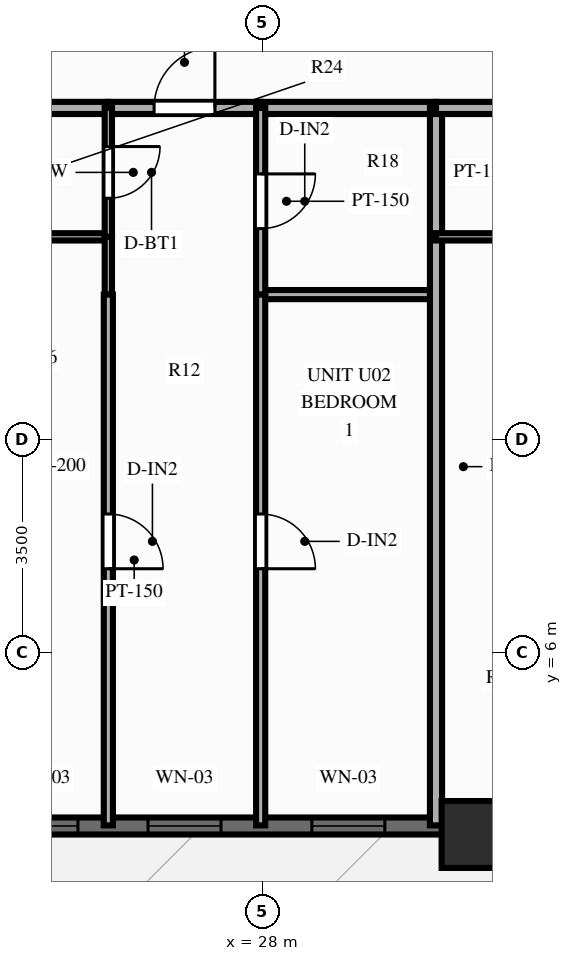
"""IFC4 building model, lengths in metres.
Left out: names, types, materials, properties, quantities, classifications, styles, units other than length and angle.
Written with IfcOpenShell. Run it as: python <this file> out.ifc"""

import sys

from ifc_helpers import new_model, si_unit, direction, frame, frame_2d, origin, origin_2d, place, context, subcontext, project, spatial, rectangle, extrude, source, transform, mapped, element, fill, save


model = new_model("IFC4")
c1 = context("Model", 3, precision=1e-05, world=origin(), true_north=direction((0.0, 1.0)))
c2 = subcontext(c1, "Body", "Model", "MODEL_VIEW")
j1 = project(units=[si_unit("LENGTHUNIT", "METRE"), si_unit("PLANEANGLEUNIT", "RADIAN")], contexts=[c1])
p1 = place(None, origin())
s1 = spatial("IfcSite", under=j1, at=p1, CompositionType="ELEMENT")
p2 = place(p1, origin())
s2 = spatial("IfcBuilding", under=s1, at=p2, CompositionType="ELEMENT")
p3 = place(p2, frame((0.0, 0.0, 22.4)))
s3 = spatial("IfcBuildingStorey", under=s2, at=p3, CompositionType="ELEMENT", Elevation=22.4)
m1 = source(origin(), c2, "Body", "SweptSolid", [
    extrude(rectangle(XDim=1.1, YDim=1.1, at=origin_2d()), origin(), (0.0, 0.0, 1.0), 3.0),
])
p4 = place(p3, frame((31.5, 3.0, 0.0), z_axis=(0.0, 0.0, 1.0), x_axis=(1.0, 0.0, 0.0)))
e1 = element("IfcColumn", 1, at=p4, inside=s3, PredefinedType="COLUMN", context=c2, shape_type="MappedRepresentation", body=[
    mapped(m1, transform((0.0, 0.0, 0.0), scale=1.0)),
])
p5 = place(p3, frame((15.5, 3.14, 0.0), z_axis=(0.0, 0.0, 1.0), x_axis=(1.0, 0.0, 0.0)))
e2 = element("IfcWall", 2, at=p5, inside=s3, PredefinedType="SOLIDWALL", context=c2, shape_type="SweptSolid", body=[
    extrude(rectangle(XDim=45.0, YDim=0.28, at=frame_2d((22.5, 0.0))), origin(), (0.0, 0.0, 1.0), 2.28),
])
p6 = place(p5, frame((0.785, 0.0, 0.25)))
e3 = element("IfcOpeningElement", 3, at=p6, cuts=e2, PredefinedType="OPENING", context=c2, shape_type="SweptSolid", body=[
    extrude(rectangle(XDim=1.2, YDim=1.5, at=frame_2d((0.6, 0.75))), frame((0.0, 0.152, 0.0), z_axis=(0.0, -1.0, 0.0), x_axis=(1.0, 0.0, 0.0)), (0.0, 0.0, 1.0), 0.304),
])
p7 = place(p5, frame((3.033, 0.0, 0.25)))
e4 = element("IfcOpeningElement", 4, at=p7, cuts=e2, PredefinedType="OPENING", context=c2, shape_type="SweptSolid", body=[
    extrude(rectangle(XDim=1.2, YDim=1.5, at=frame_2d((0.6, 0.75))), frame((0.0, 0.152, 0.0), z_axis=(0.0, -1.0, 0.0), x_axis=(1.0, 0.0, 0.0)), (0.0, 0.0, 1.0), 0.304),
])
p8 = place(p5, frame((5.727, 0.0, 0.25)))
e5 = element("IfcOpeningElement", 5, at=p8, cuts=e2, PredefinedType="OPENING", context=c2, shape_type="SweptSolid", body=[
    extrude(rectangle(XDim=1.2, YDim=1.5, at=frame_2d((0.6, 0.75))), frame((0.0, 0.152, 0.0), z_axis=(0.0, -1.0, 0.0), x_axis=(1.0, 0.0, 0.0)), (0.0, 0.0, 1.0), 0.304),
])
p9 = place(p5, frame((8.269, 0.0, 0.25)))
e6 = element("IfcOpeningElement", 6, at=p9, cuts=e2, PredefinedType="OPENING", context=c2, shape_type="SweptSolid", body=[
    extrude(rectangle(XDim=1.2, YDim=1.5, at=frame_2d((0.6, 0.75))), frame((0.0, 0.152, 0.0), z_axis=(0.0, -1.0, 0.0), x_axis=(1.0, 0.0, 0.0)), (0.0, 0.0, 1.0), 0.304),
])
p10 = place(p5, frame((10.621, 0.0, 0.25)))
e7 = element("IfcOpeningElement", 7, at=p10, cuts=e2, PredefinedType="OPENING", context=c2, shape_type="SweptSolid", body=[
    extrude(rectangle(XDim=1.2, YDim=1.5, at=frame_2d((0.6, 0.75))), frame((0.0, 0.152, 0.0), z_axis=(0.0, -1.0, 0.0), x_axis=(1.0, 0.0, 0.0)), (0.0, 0.0, 1.0), 0.304),
])
p11 = place(p5, frame((13.316, 0.0, 0.25)))
e8 = element("IfcOpeningElement", 8, at=p11, cuts=e2, PredefinedType="OPENING", context=c2, shape_type="SweptSolid", body=[
    extrude(rectangle(XDim=1.2, YDim=1.5, at=frame_2d((0.6, 0.75))), frame((0.0, 0.152, 0.0), z_axis=(0.0, -1.0, 0.0), x_axis=(1.0, 0.0, 0.0)), (0.0, 0.0, 1.0), 0.304),
])
p12 = place(p5, frame((16.624, 0.0, 0.25)))
e9 = element("IfcOpeningElement", 9, at=p12, cuts=e2, PredefinedType="OPENING", context=c2, shape_type="SweptSolid", body=[
    extrude(rectangle(XDim=0.7, YDim=1.5, at=frame_2d((0.35, 0.75))), frame((0.0, 0.152, 0.0), z_axis=(0.0, -1.0, 0.0), x_axis=(1.0, 0.0, 0.0)), (0.0, 0.0, 1.0), 0.304),
])
p13 = place(p5, frame((18.141, 0.0, 0.25)))
e10 = element("IfcOpeningElement", 10, at=p13, cuts=e2, PredefinedType="OPENING", context=c2, shape_type="SweptSolid", body=[
    extrude(rectangle(XDim=1.2, YDim=1.5, at=frame_2d((0.6, 0.75))), frame((0.0, 0.152, 0.0), z_axis=(0.0, -1.0, 0.0), x_axis=(1.0, 0.0, 0.0)), (0.0, 0.0, 1.0), 0.304),
])
p14 = place(p5, frame((21.874, 0.0, 0.0), z_axis=(0.0, 0.0, 1.0), x_axis=(-1.0, 0.0, 0.0)))
e11 = element("IfcOpeningElement", 11, at=p14, cuts=e2, PredefinedType="OPENING", context=c2, shape_type="SweptSolid", body=[
    extrude(rectangle(XDim=1.1, YDim=2.15, at=frame_2d((0.55, 1.075))), frame((0.0, 0.152, 0.0), z_axis=(0.0, -1.0, 0.0), x_axis=(1.0, 0.0, 0.0)), (0.0, 0.0, 1.0), 0.304),
])
p15 = place(p5, frame((23.223, 0.0, 0.25)))
e12 = element("IfcOpeningElement", 12, at=p15, cuts=e2, PredefinedType="OPENING", context=c2, shape_type="SweptSolid", body=[
    extrude(rectangle(XDim=1.2, YDim=1.5, at=frame_2d((0.6, 0.75))), frame((0.0, 0.152, 0.0), z_axis=(0.0, -1.0, 0.0), x_axis=(1.0, 0.0, 0.0)), (0.0, 0.0, 1.0), 0.304),
])
p16 = place(p5, frame((25.507, 0.0, 0.25)))
e13 = element("IfcOpeningElement", 13, at=p16, cuts=e2, PredefinedType="OPENING", context=c2, shape_type="SweptSolid", body=[
    extrude(rectangle(XDim=1.2, YDim=1.5, at=frame_2d((0.6, 0.75))), frame((0.0, 0.152, 0.0), z_axis=(0.0, -1.0, 0.0), x_axis=(1.0, 0.0, 0.0)), (0.0, 0.0, 1.0), 0.304),
])
p17 = place(p5, frame((27.6, 0.0, 0.25)))
e14 = element("IfcOpeningElement", 14, at=p17, cuts=e2, PredefinedType="OPENING", context=c2, shape_type="SweptSolid", body=[
    extrude(rectangle(XDim=0.7, YDim=1.5, at=frame_2d((0.35, 0.75))), frame((0.0, 0.152, 0.0), z_axis=(0.0, -1.0, 0.0), x_axis=(1.0, 0.0, 0.0)), (0.0, 0.0, 1.0), 0.304),
])
p18 = place(p5, frame((30.589, 0.0, 0.25)))
e15 = element("IfcOpeningElement", 15, at=p18, cuts=e2, PredefinedType="OPENING", context=c2, shape_type="SweptSolid", body=[
    extrude(rectangle(XDim=1.2, YDim=1.5, at=frame_2d((0.6, 0.75))), frame((0.0, 0.152, 0.0), z_axis=(0.0, -1.0, 0.0), x_axis=(1.0, 0.0, 0.0)), (0.0, 0.0, 1.0), 0.304),
])
p19 = place(p5, frame((32.872, 0.0, 0.25)))
e16 = element("IfcOpeningElement", 16, at=p19, cuts=e2, PredefinedType="OPENING", context=c2, shape_type="SweptSolid", body=[
    extrude(rectangle(XDim=1.2, YDim=1.5, at=frame_2d((0.6, 0.75))), frame((0.0, 0.152, 0.0), z_axis=(0.0, -1.0, 0.0), x_axis=(1.0, 0.0, 0.0)), (0.0, 0.0, 1.0), 0.304),
])
p20 = place(p5, frame((35.455, 0.0, 0.25)))
e17 = element("IfcOpeningElement", 17, at=p20, cuts=e2, PredefinedType="OPENING", context=c2, shape_type="SweptSolid", body=[
    extrude(rectangle(XDim=1.2, YDim=1.5, at=frame_2d((0.6, 0.75))), frame((0.0, 0.152, 0.0), z_axis=(0.0, -1.0, 0.0), x_axis=(1.0, 0.0, 0.0)), (0.0, 0.0, 1.0), 0.304),
])
p21 = place(p5, frame((37.954, 0.0, 0.25)))
e18 = element("IfcOpeningElement", 18, at=p21, cuts=e2, PredefinedType="OPENING", context=c2, shape_type="SweptSolid", body=[
    extrude(rectangle(XDim=1.2, YDim=1.5, at=frame_2d((0.6, 0.75))), frame((0.0, 0.152, 0.0), z_axis=(0.0, -1.0, 0.0), x_axis=(1.0, 0.0, 0.0)), (0.0, 0.0, 1.0), 0.304),
])
p22 = place(p5, frame((40.238, 0.0, 0.25)))
e19 = element("IfcOpeningElement", 19, at=p22, cuts=e2, PredefinedType="OPENING", context=c2, shape_type="SweptSolid", body=[
    extrude(rectangle(XDim=1.2, YDim=1.5, at=frame_2d((0.6, 0.75))), frame((0.0, 0.152, 0.0), z_axis=(0.0, -1.0, 0.0), x_axis=(1.0, 0.0, 0.0)), (0.0, 0.0, 1.0), 0.304),
])
p23 = place(p5, frame((42.716, 0.0, 0.25)))
e20 = element("IfcOpeningElement", 20, at=p23, cuts=e2, PredefinedType="OPENING", context=c2, shape_type="SweptSolid", body=[
    extrude(rectangle(XDim=1.2, YDim=1.5, at=frame_2d((0.6, 0.75))), frame((0.0, 0.152, 0.0), z_axis=(0.0, -1.0, 0.0), x_axis=(1.0, 0.0, 0.0)), (0.0, 0.0, 1.0), 0.304),
])
p24 = place(p3, frame((23.269, 14.95, 0.0), z_axis=(0.0, 0.0, 1.0), x_axis=(1.0, 0.0, 0.0)))
e21 = element("IfcWall", 21, at=p24, inside=s3, PredefinedType="PARTITIONING", context=c2, shape_type="SweptSolid", body=[
    extrude(rectangle(XDim=2.2, YDim=0.2, at=frame_2d((1.1, 0.0))), origin(), (0.0, 0.0, 1.0), 2.79),
])
p25 = place(p3, frame((25.469, 14.95, 0.0), z_axis=(0.0, 0.0, 1.0), x_axis=(1.0, 0.0, 0.0)))
e22 = element("IfcWall", 22, at=p25, inside=s3, PredefinedType="PARTITIONING", context=c2, shape_type="SweptSolid", body=[
    extrude(rectangle(XDim=2.505, YDim=0.2, at=frame_2d((1.252, 0.0))), origin(), (0.0, 0.0, 1.0), 2.79),
])
p26 = place(p25, frame((0.752, 0.0, 0.0)))
e23 = element("IfcOpeningElement", 23, at=p26, cuts=e22, PredefinedType="OPENING", context=c2, shape_type="SweptSolid", body=[
    extrude(rectangle(XDim=1.0, YDim=2.15, at=frame_2d((0.5, 1.075))), frame((0.0, 0.112, 0.0), z_axis=(0.0, -1.0, 0.0), x_axis=(1.0, 0.0, 0.0)), (0.0, 0.0, 1.0), 0.224),
])
p27 = place(p3, frame((27.974, 14.95, 0.0), z_axis=(0.0, 0.0, 1.0), x_axis=(1.0, 0.0, 0.0)))
e24 = element("IfcWall", 24, at=p27, inside=s3, PredefinedType="PARTITIONING", context=c2, shape_type="SweptSolid", body=[
    extrude(rectangle(XDim=2.884, YDim=0.2, at=frame_2d((1.442, 0.0))), origin(), (0.0, 0.0, 1.0), 2.79),
])
p28 = place(p3, frame((23.269, 12.83, 0.0), z_axis=(0.0, 0.0, 1.0), x_axis=(1.0, 0.0, 0.0)))
e25 = element("IfcWall", 25, at=p28, inside=s3, PredefinedType="PARTITIONING", context=c2, shape_type="SweptSolid", body=[
    extrude(rectangle(XDim=2.2, YDim=0.12, at=frame_2d((1.1, 0.0))), origin(), (0.0, 0.0, 1.0), 2.79),
])
p29 = place(p3, frame((27.974, 11.88, 0.0), z_axis=(0.0, 0.0, 1.0), x_axis=(1.0, 0.0, 0.0)))
e26 = element("IfcWall", 26, at=p29, inside=s3, PredefinedType="PARTITIONING", context=c2, shape_type="SweptSolid", body=[
    extrude(rectangle(XDim=2.884, YDim=0.15, at=frame_2d((1.442, 0.0))), origin(), (0.0, 0.0, 1.0), 2.79),
])
p30 = place(p3, frame((25.469, 14.95, 0.0), z_axis=(0.0, 0.0, 1.0), x_axis=(0.0, -1.0, 0.0)))
e27 = element("IfcWall", 27, at=p30, inside=s3, PredefinedType="PARTITIONING", context=c2, shape_type="SweptSolid", body=[
    extrude(rectangle(XDim=2.12, YDim=0.12, at=frame_2d((1.06, 0.0))), origin(), (0.0, 0.0, 1.0), 2.79),
])
p31 = place(p30, frame((0.635, 0.0, 0.0)))
e28 = element("IfcOpeningElement", 28, at=p31, cuts=e27, PredefinedType="OPENING", context=c2, shape_type="SweptSolid", body=[
    extrude(rectangle(XDim=0.85, YDim=2.05, at=frame_2d((0.425, 1.025))), frame((0.0, 0.072, 0.0), z_axis=(0.0, -1.0, 0.0), x_axis=(1.0, 0.0, 0.0)), (0.0, 0.0, 1.0), 0.144),
])
p32 = place(p3, frame((25.469, 12.83, 0.0), z_axis=(0.0, 0.0, 1.0), x_axis=(0.0, -1.0, 0.0)))
e29 = element("IfcWall", 29, at=p32, inside=s3, PredefinedType="PARTITIONING", context=c2, shape_type="SweptSolid", body=[
    extrude(rectangle(XDim=0.95, YDim=0.12, at=frame_2d((0.475, 0.0))), origin(), (0.0, 0.0, 1.0), 2.79),
])
p33 = place(p3, frame((25.469, 11.88, 0.0), z_axis=(0.0, 0.0, 1.0), x_axis=(0.0, -1.0, 0.0)))
e30 = element("IfcWall", 30, at=p33, inside=s3, PredefinedType="PARTITIONING", context=c2, shape_type="SweptSolid", body=[
    extrude(rectangle(XDim=8.73, YDim=0.15, at=frame_2d((4.365, 0.0))), origin(), (0.0, 0.0, 1.0), 2.79),
])
p34 = place(p33, frame((3.609, 0.0, 0.0)))
e31 = element("IfcOpeningElement", 31, at=p34, cuts=e30, PredefinedType="OPENING", context=c2, shape_type="SweptSolid", body=[
    extrude(rectangle(XDim=0.9, YDim=2.1, at=frame_2d((0.45, 1.05))), frame((0.0, 0.087, 0.0), z_axis=(0.0, -1.0, 0.0), x_axis=(1.0, 0.0, 0.0)), (0.0, 0.0, 1.0), 0.174),
])
p35 = place(p3, frame((27.974, 14.95, 0.0), z_axis=(0.0, 0.0, 1.0), x_axis=(0.0, -1.0, 0.0)))
e32 = element("IfcWall", 32, at=p35, inside=s3, PredefinedType="PARTITIONING", context=c2, shape_type="SweptSolid", body=[
    extrude(rectangle(XDim=3.07, YDim=0.15, at=frame_2d((1.535, 0.0))), origin(), (0.0, 0.0, 1.0), 2.79),
])
p36 = place(p35, frame((1.085, 0.0, 0.0)))
e33 = element("IfcOpeningElement", 33, at=p36, cuts=e32, PredefinedType="OPENING", context=c2, shape_type="SweptSolid", body=[
    extrude(rectangle(XDim=0.9, YDim=2.1, at=frame_2d((0.45, 1.05))), frame((0.0, 0.087, 0.0), z_axis=(0.0, -1.0, 0.0), x_axis=(1.0, 0.0, 0.0)), (0.0, 0.0, 1.0), 0.174),
])
p37 = place(p3, frame((27.974, 11.88, 0.0), z_axis=(0.0, 0.0, 1.0), x_axis=(0.0, -1.0, 0.0)))
e34 = element("IfcWall", 34, at=p37, inside=s3, PredefinedType="PARTITIONING", context=c2, shape_type="SweptSolid", body=[
    extrude(rectangle(XDim=8.73, YDim=0.15, at=frame_2d((4.365, 0.0))), origin(), (0.0, 0.0, 1.0), 2.79),
])
p38 = place(p37, frame((3.609, 0.0, 0.0)))
e35 = element("IfcOpeningElement", 35, at=p38, cuts=e34, PredefinedType="OPENING", context=c2, shape_type="SweptSolid", body=[
    extrude(rectangle(XDim=0.9, YDim=2.1, at=frame_2d((0.45, 1.05))), frame((0.0, 0.087, 0.0), z_axis=(0.0, -1.0, 0.0), x_axis=(1.0, 0.0, 0.0)), (0.0, 0.0, 1.0), 0.174),
])
p39 = place(p3, frame((30.858, 14.95, 0.0), z_axis=(0.0, 0.0, 1.0), x_axis=(0.0, -1.0, 0.0)))
e36 = element("IfcWall", 36, at=p39, inside=s3, PredefinedType="PARTITIONING", context=c2, shape_type="SweptSolid", body=[
    extrude(rectangle(XDim=11.8, YDim=0.2, at=frame_2d((5.9, 0.0))), origin(), (0.0, 0.0, 1.0), 2.24),
])
p40 = place(p3, frame((30.858, 14.95, 0.0), z_axis=(0.0, 0.0, 1.0), x_axis=(1.0, 0.0, 0.0)))
e37 = element("IfcWall", 37, at=p40, inside=s3, PredefinedType="PARTITIONING", context=c2, shape_type="SweptSolid", body=[
    extrude(rectangle(XDim=2.2, YDim=0.2, at=frame_2d((1.1, 0.0))), origin(), (0.0, 0.0, 1.0), 2.79),
])
p41 = place(p3, frame((30.858, 12.83, 0.0), z_axis=(0.0, 0.0, 1.0), x_axis=(1.0, 0.0, 0.0)))
e38 = element("IfcWall", 38, at=p41, inside=s3, PredefinedType="PARTITIONING", context=c2, shape_type="SweptSolid", body=[
    extrude(rectangle(XDim=2.2, YDim=0.12, at=frame_2d((1.1, 0.0))), origin(), (0.0, 0.0, 1.0), 2.79),
])
m2 = source(origin(), c2, "Body", "SweptSolid", [
    extrude(rectangle(XDim=1.2, YDim=1.5, at=frame_2d((0.6, 0.75))), frame((0.0, 0.03, 0.0), z_axis=(0.0, -1.0, 0.0), x_axis=(1.0, 0.0, 0.0)), (0.0, 0.0, 1.0), 0.06),
])
p42 = place(p9, origin())
e39 = element("IfcWindow", 39, at=p42, inside=s3, PartitioningType="SINGLE_PANEL", PredefinedType="WINDOW", context=c2, shape_type="MappedRepresentation", body=[
    mapped(m2, transform((0.0, 0.0, 0.0), scale=1.0)),
])
fill(e6, e39)
p43 = place(p10, origin())
e40 = element("IfcWindow", 40, at=p43, inside=s3, PartitioningType="SINGLE_PANEL", PredefinedType="WINDOW", context=c2, shape_type="MappedRepresentation", body=[
    mapped(m2, transform((0.0, 0.0, 0.0), scale=1.0)),
])
fill(e7, e40)
p44 = place(p11, origin())
e41 = element("IfcWindow", 41, at=p44, inside=s3, PartitioningType="SINGLE_PANEL", PredefinedType="WINDOW", context=c2, shape_type="MappedRepresentation", body=[
    mapped(m2, transform((0.0, 0.0, 0.0), scale=1.0)),
])
fill(e8, e41)
m3 = source(origin(), c2, "Body", "SweptSolid", [
    extrude(rectangle(XDim=1.0, YDim=2.15, at=frame_2d((0.5, 1.075))), frame((0.0, 0.025, 0.0), z_axis=(0.0, -1.0, 0.0), x_axis=(1.0, 0.0, 0.0)), (0.0, 0.0, 1.0), 0.05),
])
p45 = place(p26, origin())
e42 = element("IfcDoor", 42, at=p45, inside=s3, OperationType="SINGLE_SWING_RIGHT", PredefinedType="DOOR", context=c2, shape_type="MappedRepresentation", body=[
    mapped(m3, transform((0.0, 0.0, 0.0), scale=1.0)),
])
fill(e23, e42)
m4 = source(origin(), c2, "Body", "SweptSolid", [
    extrude(rectangle(XDim=0.85, YDim=2.05, at=frame_2d((0.425, 1.025))), frame((0.0, 0.025, 0.0), z_axis=(0.0, -1.0, 0.0), x_axis=(1.0, 0.0, 0.0)), (0.0, 0.0, 1.0), 0.05),
])
p46 = place(p31, origin())
e43 = element("IfcDoor", 43, at=p46, inside=s3, OperationType="SINGLE_SWING_LEFT", PredefinedType="DOOR", context=c2, shape_type="MappedRepresentation", body=[
    mapped(m4, transform((0.0, 0.0, 0.0), scale=1.0)),
])
fill(e28, e43)
m5 = source(origin(), c2, "Body", "SweptSolid", [
    extrude(rectangle(XDim=0.9, YDim=2.1, at=frame_2d((0.45, 1.05))), frame((0.0, 0.025, 0.0), z_axis=(0.0, -1.0, 0.0), x_axis=(1.0, 0.0, 0.0)), (0.0, 0.0, 1.0), 0.05),
])
p47 = place(p34, origin())
e44 = element("IfcDoor", 44, at=p47, inside=s3, OperationType="SINGLE_SWING_RIGHT", PredefinedType="DOOR", context=c2, shape_type="MappedRepresentation", body=[
    mapped(m5, transform((0.0, 0.0, 0.0), scale=1.0)),
])
fill(e31, e44)
p48 = place(p36, origin())
e45 = element("IfcDoor", 45, at=p48, inside=s3, OperationType="SINGLE_SWING_LEFT", PredefinedType="DOOR", context=c2, shape_type="MappedRepresentation", body=[
    mapped(m5, transform((0.0, 0.0, 0.0), scale=1.0)),
])
fill(e33, e45)
p49 = place(p38, origin())
e46 = element("IfcDoor", 46, at=p49, inside=s3, OperationType="SINGLE_SWING_RIGHT", PredefinedType="DOOR", context=c2, shape_type="MappedRepresentation", body=[
    mapped(m5, transform((0.0, 0.0, 0.0), scale=1.0)),
])
fill(e35, e46)
save(model, sys.argv[1])
